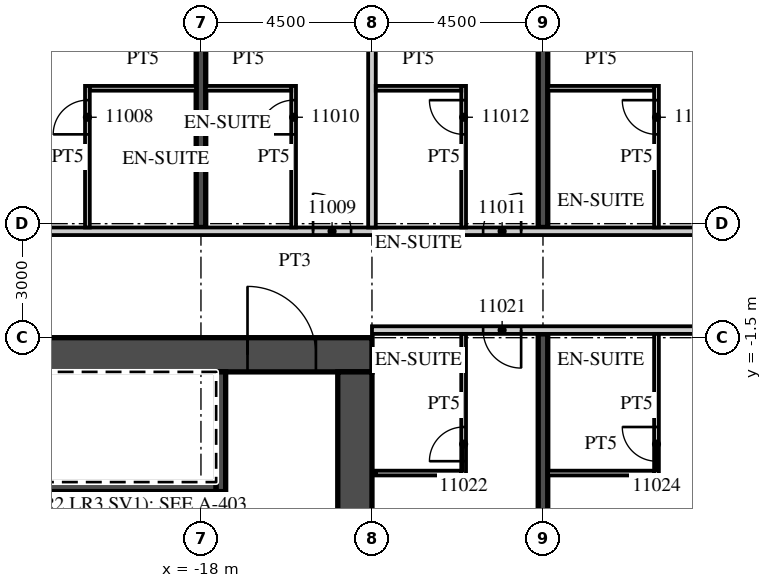
"""IFC4 building model, lengths in metres.
Left out: names, types, materials, properties, quantities, classifications, styles, units other than length and angle.
Written with IfcOpenShell. Run it as: python <this file> out.ifc"""

import sys

from ifc_helpers import new_model, si_unit, direction, frame, frame_2d, origin, place, context, subcontext, project, spatial, rectangle, extrude, element, fill, save


model = new_model("IFC4")
c1 = context("Model", 3, precision=1e-05, world=origin(), true_north=direction((0.0, 1.0)))
c2 = subcontext(c1, "Body", "Model", "MODEL_VIEW")
j1 = project(units=[si_unit("LENGTHUNIT", "METRE"), si_unit("PLANEANGLEUNIT", "RADIAN")], contexts=[c1])
p1 = place(None, origin())
s1 = spatial("IfcSite", under=j1, at=p1, CompositionType="ELEMENT")
p2 = place(p1, origin())
s2 = spatial("IfcBuilding", under=s1, at=p2, CompositionType="ELEMENT")
p3 = place(p2, frame((0.0, 0.0, 66.6)))
s3 = spatial("IfcBuildingStorey", under=s2, at=p3, CompositionType="ELEMENT", Elevation=66.6)
for number, where, z_axis, x_axis in (
    (1, (-18.0, 1.4, 0.0), (0.0, 0.0, 1.0), (0.0, 1.0, 0.0)),
    (2, (-9.0, -21.54, 0.0), (0.0, 0.0, 1.0), (0.0, 1.0, 0.0)),
    (3, (-9.0, 1.4, 0.0), (0.0, 0.0, 1.0), (0.0, 1.0, 0.0)),
):
    element("IfcWall", number, at=place(p3, frame(where, z_axis=z_axis, x_axis=x_axis)), inside=s3, PredefinedType="SHEAR", context=c2, shape_type="SweptSolid", body=[
        extrude(rectangle(XDim=20.14, YDim=0.25, at=frame_2d((10.07, 0.0))), origin(), (0.0, 0.0, 1.0), 3.3),
    ])
p4 = place(p3, frame((-44.55, 1.3, 0.0), z_axis=(0.0, 0.0, 1.0), x_axis=(1.0, 0.0, 0.0)))
e4 = element("IfcWall", 4, at=p4, inside=s3, PredefinedType="PARTITIONING", context=c2, shape_type="SweptSolid", body=[
    extrude(rectangle(XDim=58.05, YDim=0.2, at=frame_2d((29.025, 0.0))), origin(), (0.0, 0.0, 1.0), 3.02),
])
p5 = place(p4, frame((0.525, 0.0, 0.0)))
e5 = element("IfcOpeningElement", 5, at=p5, cuts=e4, PredefinedType="OPENING", context=c2, shape_type="SweptSolid", body=[
    extrude(rectangle(XDim=1.0, YDim=2.1, at=frame_2d((0.5, 1.05))), frame((0.0, 0.11, 0.0), z_axis=(0.0, -1.0, 0.0), x_axis=(1.0, 0.0, 0.0)), (0.0, 0.0, 1.0), 0.22),
])
p6 = place(p4, frame((6.975, 0.0, 0.0)))
e6 = element("IfcOpeningElement", 6, at=p6, cuts=e4, PredefinedType="OPENING", context=c2, shape_type="SweptSolid", body=[
    extrude(rectangle(XDim=1.0, YDim=2.1, at=frame_2d((0.5, 1.05))), frame((0.0, 0.11, 0.0), z_axis=(0.0, -1.0, 0.0), x_axis=(1.0, 0.0, 0.0)), (0.0, 0.0, 1.0), 0.22),
])
p7 = place(p4, frame((10.987, 0.0, 0.0)))
e7 = element("IfcOpeningElement", 7, at=p7, cuts=e4, PredefinedType="OPENING", context=c2, shape_type="SweptSolid", body=[
    extrude(rectangle(XDim=1.2, YDim=2.1, at=frame_2d((0.6, 1.05))), frame((0.0, 0.11, 0.0), z_axis=(0.0, -1.0, 0.0), x_axis=(1.0, 0.0, 0.0)), (0.0, 0.0, 1.0), 0.22),
])
p8 = place(p4, frame((19.987, 0.0, 0.0)))
e8 = element("IfcOpeningElement", 8, at=p8, cuts=e4, PredefinedType="OPENING", context=c2, shape_type="SweptSolid", body=[
    extrude(rectangle(XDim=1.2, YDim=2.1, at=frame_2d((0.6, 1.05))), frame((0.0, 0.11, 0.0), z_axis=(0.0, -1.0, 0.0), x_axis=(1.0, 0.0, 0.0)), (0.0, 0.0, 1.0), 0.22),
])
p9 = place(p4, frame((29.5, 0.0, 0.0)))
e9 = element("IfcOpeningElement", 9, at=p9, cuts=e4, PredefinedType="OPENING", context=c2, shape_type="SweptSolid", body=[
    extrude(rectangle(XDim=1.0, YDim=2.1, at=frame_2d((0.5, 1.05))), frame((0.0, 0.11, 0.0), z_axis=(0.0, -1.0, 0.0), x_axis=(1.0, 0.0, 0.0)), (0.0, 0.0, 1.0), 0.22),
])
p10 = place(p4, frame((33.975, 0.0, 0.0)))
e10 = element("IfcOpeningElement", 10, at=p10, cuts=e4, PredefinedType="OPENING", context=c2, shape_type="SweptSolid", body=[
    extrude(rectangle(XDim=1.0, YDim=2.1, at=frame_2d((0.5, 1.05))), frame((0.0, 0.11, 0.0), z_axis=(0.0, -1.0, 0.0), x_axis=(1.0, 0.0, 0.0)), (0.0, 0.0, 1.0), 0.22),
])
p11 = place(p4, frame((40.912, 0.0, 0.0)))
e11 = element("IfcOpeningElement", 11, at=p11, cuts=e4, PredefinedType="OPENING", context=c2, shape_type="SweptSolid", body=[
    extrude(rectangle(XDim=1.2, YDim=2.1, at=frame_2d((0.6, 1.05))), frame((0.0, 0.11, 0.0), z_axis=(0.0, -1.0, 0.0), x_axis=(1.0, 0.0, 0.0)), (0.0, 0.0, 1.0), 0.22),
])
p12 = place(p4, frame((47.5, 0.0, 0.0)))
e12 = element("IfcOpeningElement", 12, at=p12, cuts=e4, PredefinedType="OPENING", context=c2, shape_type="SweptSolid", body=[
    extrude(rectangle(XDim=1.0, YDim=2.1, at=frame_2d((0.5, 1.05))), frame((0.0, 0.11, 0.0), z_axis=(0.0, -1.0, 0.0), x_axis=(1.0, 0.0, 0.0)), (0.0, 0.0, 1.0), 0.22),
])
p13 = place(p4, frame((51.975, 0.0, 0.0)))
e13 = element("IfcOpeningElement", 13, at=p13, cuts=e4, PredefinedType="OPENING", context=c2, shape_type="SweptSolid", body=[
    extrude(rectangle(XDim=1.0, YDim=2.1, at=frame_2d((0.5, 1.05))), frame((0.0, 0.11, 0.0), z_axis=(0.0, -1.0, 0.0), x_axis=(1.0, 0.0, 0.0)), (0.0, 0.0, 1.0), 0.22),
])
p14 = place(p4, frame((56.475, 0.0, 0.0)))
e14 = element("IfcOpeningElement", 14, at=p14, cuts=e4, PredefinedType="OPENING", context=c2, shape_type="SweptSolid", body=[
    extrude(rectangle(XDim=1.0, YDim=2.1, at=frame_2d((0.5, 1.05))), frame((0.0, 0.11, 0.0), z_axis=(0.0, -1.0, 0.0), x_axis=(1.0, 0.0, 0.0)), (0.0, 0.0, 1.0), 0.22),
])
p15 = place(p3, frame((-20.988, 1.4, 0.0), z_axis=(0.0, 0.0, 1.0), x_axis=(0.0, 1.0, 0.0)))
e15 = element("IfcWall", 15, at=p15, inside=s3, PredefinedType="PARTITIONING", context=c2, shape_type="SweptSolid", body=[
    extrude(rectangle(XDim=3.725, YDim=0.125, at=frame_2d((1.863, 0.0))), origin(), (0.0, 0.0, 1.0), 3.02),
])
p16 = place(p15, frame((2.45, 0.0, 0.0)))
e16 = element("IfcOpeningElement", 16, at=p16, cuts=e15, PredefinedType="OPENING", context=c2, shape_type="SweptSolid", body=[
    extrude(rectangle(XDim=0.9, YDim=2.1, at=frame_2d((0.45, 1.05))), frame((0.0, 0.073, 0.0), z_axis=(0.0, -1.0, 0.0), x_axis=(1.0, 0.0, 0.0)), (0.0, 0.0, 1.0), 0.145),
])
p17 = place(p3, frame((-20.925, 5.062, 0.0), z_axis=(0.0, 0.0, 1.0), x_axis=(1.0, 0.0, 0.0)))
e17 = element("IfcWall", 17, at=p17, inside=s3, PredefinedType="PARTITIONING", context=c2, shape_type="SweptSolid", body=[
    extrude(rectangle(XDim=2.8, YDim=0.125, at=frame_2d((1.4, 0.0))), origin(), (0.0, 0.0, 1.0), 3.02),
])
p18 = place(p3, frame((-13.5, 1.4, 0.0), z_axis=(0.0, 0.0, 1.0), x_axis=(0.0, 1.0, 0.0)))
e18 = element("IfcWall", 18, at=p18, inside=s3, PredefinedType="PARTITIONING", context=c2, shape_type="SweptSolid", body=[
    extrude(rectangle(XDim=20.15, YDim=0.2, at=frame_2d((10.075, 0.0))), origin(), (0.0, 0.0, 1.0), 3.02),
])
p19 = place(p3, frame((-15.562, 1.4, 0.0), z_axis=(0.0, 0.0, 1.0), x_axis=(0.0, 1.0, 0.0)))
e19 = element("IfcWall", 19, at=p19, inside=s3, PredefinedType="PARTITIONING", context=c2, shape_type="SweptSolid", body=[
    extrude(rectangle(XDim=3.725, YDim=0.125, at=frame_2d((1.863, 0.0))), origin(), (0.0, 0.0, 1.0), 3.02),
])
p20 = place(p19, frame((2.45, 0.0, 0.0)))
e20 = element("IfcOpeningElement", 20, at=p20, cuts=e19, PredefinedType="OPENING", context=c2, shape_type="SweptSolid", body=[
    extrude(rectangle(XDim=0.9, YDim=2.1, at=frame_2d((0.45, 1.05))), frame((0.0, 0.073, 0.0), z_axis=(0.0, -1.0, 0.0), x_axis=(1.0, 0.0, 0.0)), (0.0, 0.0, 1.0), 0.145),
])
p21 = place(p3, frame((-17.875, 5.062, 0.0), z_axis=(0.0, 0.0, 1.0), x_axis=(1.0, 0.0, 0.0)))
e21 = element("IfcWall", 21, at=p21, inside=s3, PredefinedType="PARTITIONING", context=c2, shape_type="SweptSolid", body=[
    extrude(rectangle(XDim=2.25, YDim=0.125, at=frame_2d((1.125, 0.0))), origin(), (0.0, 0.0, 1.0), 3.02),
])
p22 = place(p3, frame((-11.088, 1.4, 0.0), z_axis=(0.0, 0.0, 1.0), x_axis=(0.0, 1.0, 0.0)))
e22 = element("IfcWall", 22, at=p22, inside=s3, PredefinedType="PARTITIONING", context=c2, shape_type="SweptSolid", body=[
    extrude(rectangle(XDim=3.725, YDim=0.125, at=frame_2d((1.863, 0.0))), origin(), (0.0, 0.0, 1.0), 3.02),
])
p23 = place(p22, frame((2.45, 0.0, 0.0)))
e23 = element("IfcOpeningElement", 23, at=p23, cuts=e22, PredefinedType="OPENING", context=c2, shape_type="SweptSolid", body=[
    extrude(rectangle(XDim=0.9, YDim=2.1, at=frame_2d((0.45, 1.05))), frame((0.0, 0.073, 0.0), z_axis=(0.0, -1.0, 0.0), x_axis=(1.0, 0.0, 0.0)), (0.0, 0.0, 1.0), 0.145),
])
p24 = place(p3, frame((-13.4, 5.062, 0.0), z_axis=(0.0, 0.0, 1.0), x_axis=(1.0, 0.0, 0.0)))
e24 = element("IfcWall", 24, at=p24, inside=s3, PredefinedType="PARTITIONING", context=c2, shape_type="SweptSolid", body=[
    extrude(rectangle(XDim=2.25, YDim=0.125, at=frame_2d((1.125, 0.0))), origin(), (0.0, 0.0, 1.0), 3.02),
])
p25 = place(p3, frame((-6.013, 1.4, 0.0), z_axis=(0.0, 0.0, 1.0), x_axis=(0.0, 1.0, 0.0)))
e25 = element("IfcWall", 25, at=p25, inside=s3, PredefinedType="PARTITIONING", context=c2, shape_type="SweptSolid", body=[
    extrude(rectangle(XDim=3.725, YDim=0.125, at=frame_2d((1.863, 0.0))), origin(), (0.0, 0.0, 1.0), 3.02),
])
p26 = place(p25, frame((2.45, 0.0, 0.0)))
e26 = element("IfcOpeningElement", 26, at=p26, cuts=e25, PredefinedType="OPENING", context=c2, shape_type="SweptSolid", body=[
    extrude(rectangle(XDim=0.9, YDim=2.1, at=frame_2d((0.45, 1.05))), frame((0.0, 0.073, 0.0), z_axis=(0.0, -1.0, 0.0), x_axis=(1.0, 0.0, 0.0)), (0.0, 0.0, 1.0), 0.145),
])
p27 = place(p3, frame((-8.875, 5.062, 0.0), z_axis=(0.0, 0.0, 1.0), x_axis=(1.0, 0.0, 0.0)))
e27 = element("IfcWall", 27, at=p27, inside=s3, PredefinedType="PARTITIONING", context=c2, shape_type="SweptSolid", body=[
    extrude(rectangle(XDim=2.8, YDim=0.125, at=frame_2d((1.4, 0.0))), origin(), (0.0, 0.0, 1.0), 3.02),
])
p28 = place(p3, frame((-13.5, -1.3, 0.0), z_axis=(0.0, 0.0, 1.0), x_axis=(1.0, 0.0, 0.0)))
e28 = element("IfcWall", 28, at=p28, inside=s3, PredefinedType="PARTITIONING", context=c2, shape_type="SweptSolid", body=[
    extrude(rectangle(XDim=58.05, YDim=0.2, at=frame_2d((29.025, 0.0))), origin(), (0.0, 0.0, 1.0), 3.02),
])
p29 = place(p28, frame((2.925, 0.0, 0.0)))
e29 = element("IfcOpeningElement", 29, at=p29, cuts=e28, PredefinedType="OPENING", context=c2, shape_type="SweptSolid", body=[
    extrude(rectangle(XDim=1.0, YDim=2.1, at=frame_2d((0.5, 1.05))), frame((0.0, 0.11, 0.0), z_axis=(0.0, -1.0, 0.0), x_axis=(1.0, 0.0, 0.0)), (0.0, 0.0, 1.0), 0.22),
])
p30 = place(p28, frame((9.863, 0.0, 0.0)))
e30 = element("IfcOpeningElement", 30, at=p30, cuts=e28, PredefinedType="OPENING", context=c2, shape_type="SweptSolid", body=[
    extrude(rectangle(XDim=1.2, YDim=2.1, at=frame_2d((0.6, 1.05))), frame((0.0, 0.11, 0.0), z_axis=(0.0, -1.0, 0.0), x_axis=(1.0, 0.0, 0.0)), (0.0, 0.0, 1.0), 0.22),
])
p31 = place(p28, frame((16.45, 0.0, 0.0)))
e31 = element("IfcOpeningElement", 31, at=p31, cuts=e28, PredefinedType="OPENING", context=c2, shape_type="SweptSolid", body=[
    extrude(rectangle(XDim=1.0, YDim=2.1, at=frame_2d((0.5, 1.05))), frame((0.0, 0.11, 0.0), z_axis=(0.0, -1.0, 0.0), x_axis=(1.0, 0.0, 0.0)), (0.0, 0.0, 1.0), 0.22),
])
p32 = place(p28, frame((18.55, 0.0, 0.0)))
e32 = element("IfcOpeningElement", 32, at=p32, cuts=e28, PredefinedType="OPENING", context=c2, shape_type="SweptSolid", body=[
    extrude(rectangle(XDim=1.0, YDim=2.1, at=frame_2d((0.5, 1.05))), frame((0.0, 0.11, 0.0), z_axis=(0.0, -1.0, 0.0), x_axis=(1.0, 0.0, 0.0)), (0.0, 0.0, 1.0), 0.22),
])
p33 = place(p28, frame((24.938, 0.0, 0.0)))
e33 = element("IfcOpeningElement", 33, at=p33, cuts=e28, PredefinedType="OPENING", context=c2, shape_type="SweptSolid", body=[
    extrude(rectangle(XDim=1.2, YDim=2.1, at=frame_2d((0.6, 1.05))), frame((0.0, 0.11, 0.0), z_axis=(0.0, -1.0, 0.0), x_axis=(1.0, 0.0, 0.0)), (0.0, 0.0, 1.0), 0.22),
])
p34 = place(p28, frame((33.938, 0.0, 0.0)))
e34 = element("IfcOpeningElement", 34, at=p34, cuts=e28, PredefinedType="OPENING", context=c2, shape_type="SweptSolid", body=[
    extrude(rectangle(XDim=1.2, YDim=2.1, at=frame_2d((0.6, 1.05))), frame((0.0, 0.11, 0.0), z_axis=(0.0, -1.0, 0.0), x_axis=(1.0, 0.0, 0.0)), (0.0, 0.0, 1.0), 0.22),
])
p35 = place(p28, frame((42.938, 0.0, 0.0)))
e35 = element("IfcOpeningElement", 35, at=p35, cuts=e28, PredefinedType="OPENING", context=c2, shape_type="SweptSolid", body=[
    extrude(rectangle(XDim=1.2, YDim=2.1, at=frame_2d((0.6, 1.05))), frame((0.0, 0.11, 0.0), z_axis=(0.0, -1.0, 0.0), x_axis=(1.0, 0.0, 0.0)), (0.0, 0.0, 1.0), 0.22),
])
p36 = place(p28, frame((52.425, 0.0, 0.0)))
e36 = element("IfcOpeningElement", 36, at=p36, cuts=e28, PredefinedType="OPENING", context=c2, shape_type="SweptSolid", body=[
    extrude(rectangle(XDim=1.0, YDim=2.1, at=frame_2d((0.5, 1.05))), frame((0.0, 0.11, 0.0), z_axis=(0.0, -1.0, 0.0), x_axis=(1.0, 0.0, 0.0)), (0.0, 0.0, 1.0), 0.22),
])
p37 = place(p28, frame((56.525, 0.0, 0.0)))
e37 = element("IfcOpeningElement", 37, at=p37, cuts=e28, PredefinedType="OPENING", context=c2, shape_type="SweptSolid", body=[
    extrude(rectangle(XDim=1.0, YDim=2.1, at=frame_2d((0.5, 1.05))), frame((0.0, 0.11, 0.0), z_axis=(0.0, -1.0, 0.0), x_axis=(1.0, 0.0, 0.0)), (0.0, 0.0, 1.0), 0.22),
])
p38 = place(p3, frame((-11.088, -5.125, 0.0), z_axis=(0.0, 0.0, 1.0), x_axis=(0.0, 1.0, 0.0)))
e38 = element("IfcWall", 38, at=p38, inside=s3, PredefinedType="PARTITIONING", context=c2, shape_type="SweptSolid", body=[
    extrude(rectangle(XDim=3.725, YDim=0.125, at=frame_2d((1.863, 0.0))), origin(), (0.0, 0.0, 1.0), 3.02),
])
p39 = place(p38, frame((0.375, 0.0, 0.0)))
e39 = element("IfcOpeningElement", 39, at=p39, cuts=e38, PredefinedType="OPENING", context=c2, shape_type="SweptSolid", body=[
    extrude(rectangle(XDim=0.9, YDim=2.1, at=frame_2d((0.45, 1.05))), frame((0.0, 0.073, 0.0), z_axis=(0.0, -1.0, 0.0), x_axis=(1.0, 0.0, 0.0)), (0.0, 0.0, 1.0), 0.145),
])
p40 = place(p3, frame((-13.4, -5.062, 0.0), z_axis=(0.0, 0.0, 1.0), x_axis=(1.0, 0.0, 0.0)))
e40 = element("IfcWall", 40, at=p40, inside=s3, PredefinedType="PARTITIONING", context=c2, shape_type="SweptSolid", body=[
    extrude(rectangle(XDim=2.25, YDim=0.125, at=frame_2d((1.125, 0.0))), origin(), (0.0, 0.0, 1.0), 3.02),
])
p41 = place(p3, frame((-6.013, -5.125, 0.0), z_axis=(0.0, 0.0, 1.0), x_axis=(0.0, 1.0, 0.0)))
e41 = element("IfcWall", 41, at=p41, inside=s3, PredefinedType="PARTITIONING", context=c2, shape_type="SweptSolid", body=[
    extrude(rectangle(XDim=3.725, YDim=0.125, at=frame_2d((1.863, 0.0))), origin(), (0.0, 0.0, 1.0), 3.02),
])
p42 = place(p41, frame((0.375, 0.0, 0.0)))
e42 = element("IfcOpeningElement", 42, at=p42, cuts=e41, PredefinedType="OPENING", context=c2, shape_type="SweptSolid", body=[
    extrude(rectangle(XDim=0.9, YDim=2.1, at=frame_2d((0.45, 1.05))), frame((0.0, 0.073, 0.0), z_axis=(0.0, -1.0, 0.0), x_axis=(1.0, 0.0, 0.0)), (0.0, 0.0, 1.0), 0.145),
])
p43 = place(p3, frame((-8.875, -5.062, 0.0), z_axis=(0.0, 0.0, 1.0), x_axis=(1.0, 0.0, 0.0)))
e43 = element("IfcWall", 43, at=p43, inside=s3, PredefinedType="PARTITIONING", context=c2, shape_type="SweptSolid", body=[
    extrude(rectangle(XDim=2.8, YDim=0.125, at=frame_2d((1.4, 0.0))), origin(), (0.0, 0.0, 1.0), 3.02),
])
p44 = place(p3, frame((-31.5, -1.95, 0.0), z_axis=(0.0, 0.0, 1.0), x_axis=(1.0, 0.0, 0.0)))
e44 = element("IfcWall", 44, at=p44, inside=s3, PredefinedType="SHEAR", context=c2, shape_type="SweptSolid", body=[
    extrude(rectangle(XDim=18.0, YDim=0.9, at=frame_2d((9.0, 0.0))), origin(), (0.0, 0.0, 1.0), 3.02),
])
p45 = place(p44, frame((14.725, 0.0, 0.0)))
e45 = element("IfcOpeningElement", 45, at=p45, cuts=e44, PredefinedType="OPENING", context=c2, shape_type="SweptSolid", body=[
    extrude(rectangle(XDim=1.8, YDim=2.1, at=frame_2d((0.9, 1.05))), frame((0.0, 0.46, 0.0), z_axis=(0.0, -1.0, 0.0), x_axis=(1.0, 0.0, 0.0)), (0.0, 0.0, 1.0), 0.92),
])
p46 = place(p3, frame((-13.95, -14.6, 0.0), z_axis=(0.0, 0.0, 1.0), x_axis=(0.0, 1.0, 0.0)))
e46 = element("IfcWall", 46, at=p46, inside=s3, PredefinedType="SHEAR", context=c2, shape_type="SweptSolid", body=[
    extrude(rectangle(XDim=12.2, YDim=0.9, at=frame_2d((6.1, 0.0))), origin(), (0.0, 0.0, 1.0), 3.02),
])
p47 = place(p3, frame((-30.6, -5.425, 0.0), z_axis=(0.0, 0.0, 1.0), x_axis=(1.0, 0.0, 0.0)))
e47 = element("IfcWall", 47, at=p47, inside=s3, PredefinedType="SHEAR", context=c2, shape_type="SweptSolid", body=[
    extrude(rectangle(XDim=13.0, YDim=0.25, at=frame_2d((6.5, 0.0))), origin(), (0.0, 0.0, 1.0), 3.02),
])
p48 = place(p3, frame((-17.475, -5.55, 0.0), z_axis=(0.0, 0.0, 1.0), x_axis=(0.0, 1.0, 0.0)))
e48 = element("IfcWall", 48, at=p48, inside=s3, PredefinedType="SHEAR", context=c2, shape_type="SweptSolid", body=[
    extrude(rectangle(XDim=3.15, YDim=0.25, at=frame_2d((1.575, 0.0))), origin(), (0.0, 0.0, 1.0), 3.02),
])
p49 = place(p16, origin())
e49 = element("IfcDoor", 49, at=p49, inside=s3, OperationType="SINGLE_SWING_LEFT", PredefinedType="DOOR", context=c2, shape_type="SweptSolid", body=[
    extrude(rectangle(XDim=0.9, YDim=2.1, at=frame_2d((0.45, 1.05))), frame((0.0, 0.025, 0.0), z_axis=(0.0, -1.0, 0.0), x_axis=(1.0, 0.0, 0.0)), (0.0, 0.0, 1.0), 0.05),
])
fill(e16, e49)
p50 = place(p9, origin())
e50 = element("IfcDoor", 50, at=p50, inside=s3, OperationType="SINGLE_SWING_LEFT", PredefinedType="DOOR", context=c2, shape_type="SweptSolid", body=[
    extrude(rectangle(XDim=1.0, YDim=2.1, at=frame_2d((0.5, 1.05))), frame((0.0, 0.025, 0.0), z_axis=(0.0, -1.0, 0.0), x_axis=(1.0, 0.0, 0.0)), (0.0, 0.0, 1.0), 0.05),
])
fill(e9, e50)
p51 = place(p20, origin())
e51 = element("IfcDoor", 51, at=p51, inside=s3, OperationType="SINGLE_SWING_LEFT", PredefinedType="DOOR", context=c2, shape_type="SweptSolid", body=[
    extrude(rectangle(XDim=0.9, YDim=2.1, at=frame_2d((0.45, 1.05))), frame((0.0, 0.025, 0.0), z_axis=(0.0, -1.0, 0.0), x_axis=(1.0, 0.0, 0.0)), (0.0, 0.0, 1.0), 0.05),
])
fill(e20, e51)
p52 = place(p10, origin())
e52 = element("IfcDoor", 52, at=p52, inside=s3, OperationType="SINGLE_SWING_RIGHT", PredefinedType="DOOR", context=c2, shape_type="SweptSolid", body=[
    extrude(rectangle(XDim=1.0, YDim=2.1, at=frame_2d((0.5, 1.05))), frame((0.0, 0.025, 0.0), z_axis=(0.0, -1.0, 0.0), x_axis=(1.0, 0.0, 0.0)), (0.0, 0.0, 1.0), 0.05),
])
fill(e10, e52)
p53 = place(p23, origin())
e53 = element("IfcDoor", 53, at=p53, inside=s3, OperationType="SINGLE_SWING_RIGHT", PredefinedType="DOOR", context=c2, shape_type="SweptSolid", body=[
    extrude(rectangle(XDim=0.9, YDim=2.1, at=frame_2d((0.45, 1.05))), frame((0.0, 0.025, 0.0), z_axis=(0.0, -1.0, 0.0), x_axis=(1.0, 0.0, 0.0)), (0.0, 0.0, 1.0), 0.05),
])
fill(e23, e53)
p54 = place(p26, origin())
e54 = element("IfcDoor", 54, at=p54, inside=s3, OperationType="SINGLE_SWING_RIGHT", PredefinedType="DOOR", context=c2, shape_type="SweptSolid", body=[
    extrude(rectangle(XDim=0.9, YDim=2.1, at=frame_2d((0.45, 1.05))), frame((0.0, 0.025, 0.0), z_axis=(0.0, -1.0, 0.0), x_axis=(1.0, 0.0, 0.0)), (0.0, 0.0, 1.0), 0.05),
])
fill(e26, e54)
p55 = place(p29, origin())
e55 = element("IfcDoor", 55, at=p55, inside=s3, OperationType="SINGLE_SWING_RIGHT", PredefinedType="DOOR", context=c2, shape_type="SweptSolid", body=[
    extrude(rectangle(XDim=1.0, YDim=2.1, at=frame_2d((0.5, 1.05))), frame((0.0, 0.025, 0.0), z_axis=(0.0, -1.0, 0.0), x_axis=(1.0, 0.0, 0.0)), (0.0, 0.0, 1.0), 0.05),
])
fill(e29, e55)
p56 = place(p39, origin())
e56 = element("IfcDoor", 56, at=p56, inside=s3, OperationType="SINGLE_SWING_LEFT", PredefinedType="DOOR", context=c2, shape_type="SweptSolid", body=[
    extrude(rectangle(XDim=0.9, YDim=2.1, at=frame_2d((0.45, 1.05))), frame((0.0, 0.025, 0.0), z_axis=(0.0, -1.0, 0.0), x_axis=(1.0, 0.0, 0.0)), (0.0, 0.0, 1.0), 0.05),
])
fill(e39, e56)
p57 = place(p42, origin())
e57 = element("IfcDoor", 57, at=p57, inside=s3, OperationType="SINGLE_SWING_RIGHT", PredefinedType="DOOR", context=c2, shape_type="SweptSolid", body=[
    extrude(rectangle(XDim=0.9, YDim=2.1, at=frame_2d((0.45, 1.05))), frame((0.0, 0.025, 0.0), z_axis=(0.0, -1.0, 0.0), x_axis=(1.0, 0.0, 0.0)), (0.0, 0.0, 1.0), 0.05),
])
fill(e42, e57)
p58 = place(p45, origin())
e58 = element("IfcDoor", 58, at=p58, inside=s3, OperationType="DOUBLE_DOOR_DOUBLE_SWING", PredefinedType="DOOR", context=c2, shape_type="SweptSolid", body=[
    extrude(rectangle(XDim=1.8, YDim=2.1, at=frame_2d((0.9, 1.05))), frame((0.0, 0.025, 0.0), z_axis=(0.0, -1.0, 0.0), x_axis=(1.0, 0.0, 0.0)), (0.0, 0.0, 1.0), 0.05),
])
fill(e45, e58)
save(model, sys.argv[1])
